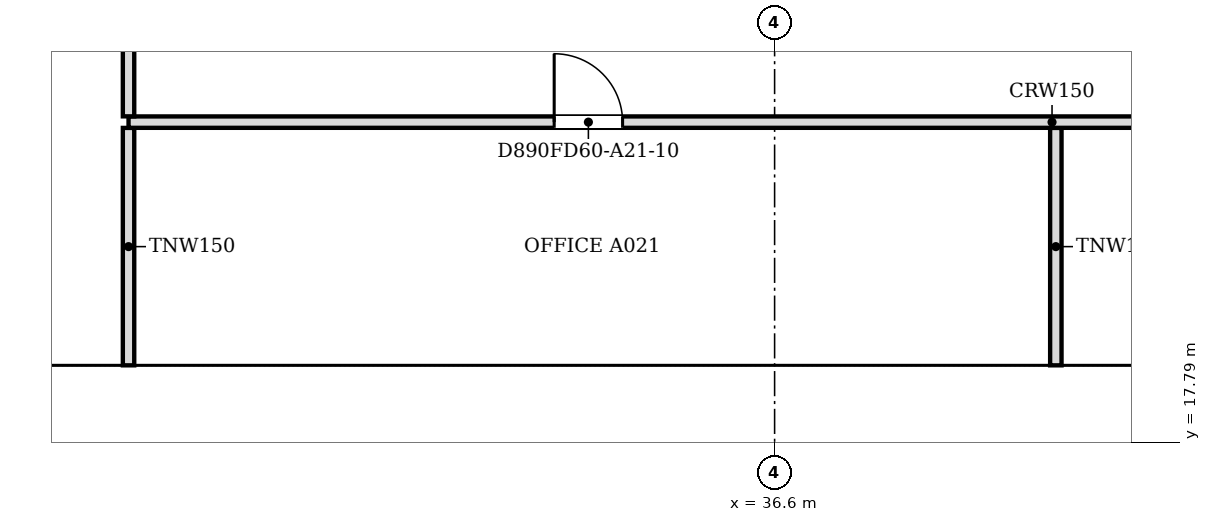
"""IFC4 building model, lengths in metres.
Left out: names, types, materials, properties, quantities, classifications, styles, units other than length and angle.
Written with IfcOpenShell. Run it as: python <this file> out.ifc"""

import sys

from ifc_helpers import new_model, si_unit, direction, frame, frame_2d, origin, place, context, subcontext, project, spatial, polyline, rectangle, outline, extrude, faceted_brep, source, transform, mapped, element, fill, save


model = new_model("IFC4")
c1 = context("Model", 3, precision=1e-05, world=origin(), true_north=direction((0.0, 1.0)))
c2 = subcontext(c1, "Body", "Model", "MODEL_VIEW")
j1 = project(units=[si_unit("LENGTHUNIT", "METRE"), si_unit("PLANEANGLEUNIT", "RADIAN")], contexts=[c1])
p1 = place(None, origin())
s1 = spatial("IfcSite", under=j1, at=p1, CompositionType="ELEMENT")
p2 = place(p1, origin())
s2 = spatial("IfcBuilding", under=s1, at=p2, CompositionType="ELEMENT")
p3 = place(p2, frame((0.0, 0.0, 248.3)))
s3 = spatial("IfcBuildingStorey", under=s2, at=p3, CompositionType="ELEMENT", Elevation=248.3)
m1 = source(origin(), c2, "Body", "SweptSolid", [
    extrude(outline(polyline([(3.05, 0.0), (6.1, 3.8), (3.05, 7.6), (0.0, 3.8), (3.05, 0.0)])), frame((0.0, 0.25, 0.0), z_axis=(0.0, -1.0, 0.0), x_axis=(1.0, 0.0, 0.0)), (0.0, 0.0, 1.0), 0.5),
])
p4 = place(p3, frame((24.4, 18.55, -3.8), z_axis=(0.0, 0.0, 1.0), x_axis=(1.0, 0.0, 0.0)))
e1 = element("IfcWall", 1, at=p4, inside=s3, PredefinedType="SOLIDWALL", context=c2, shape_type="MappedRepresentation", body=[
    mapped(m1, transform((0.0, 0.0, 0.0), scale=1.0)),
])
m2 = source(origin(), c2, "Body", "SweptSolid", [
    extrude(outline(polyline([(3.05, 0.399), (5.78, 3.8), (3.05, 7.201), (0.321, 3.8), (3.05, 0.399)])), frame((0.0, 0.26, 0.0), z_axis=(0.0, -1.0, 0.0), x_axis=(1.0, 0.0, 0.0)), (0.0, 0.0, 1.0), 0.52),
])
p5 = place(p4, origin())
e2 = element("IfcOpeningElement", 2, at=p5, cuts=e1, PredefinedType="OPENING", context=c2, shape_type="MappedRepresentation", body=[
    mapped(m2, transform((0.0, 0.0, 0.0), scale=1.0)),
])
p6 = place(p3, frame((30.5, 18.55, -3.8), z_axis=(0.0, 0.0, 1.0), x_axis=(1.0, 0.0, 0.0)))
e3 = element("IfcWall", 3, at=p6, inside=s3, PredefinedType="SOLIDWALL", context=c2, shape_type="MappedRepresentation", body=[
    mapped(m1, transform((0.0, 0.0, 0.0), scale=1.0)),
])
p7 = place(p6, origin())
e4 = element("IfcOpeningElement", 4, at=p7, cuts=e3, PredefinedType="OPENING", context=c2, shape_type="MappedRepresentation", body=[
    mapped(m2, transform((0.0, 0.0, 0.0), scale=1.0)),
])
m3 = source(origin(), c2, "Body", "Brep", [
    faceted_brep([(3.05, -0.25, 0.0), (6.1, -0.25, 3.8), (6.1, -0.25, 3.8), (3.05, -0.25, 7.6), (0.0, -0.25, 3.8), (0.0, 0.25, 3.8), (3.05, 0.25, 7.6), (6.1, 0.25, 3.8), (6.1, 0.25, 3.8), (3.05, 0.25, 0.0)], [[[0, 1, 2, 3, 4]], [[5, 6, 7, 8, 9]], [[9, 8, 1, 0]], [[7, 6, 3, 2]], [[6, 5, 4, 3]], [[5, 9, 0, 4]], [[1, 8, 7, 2]]]),
])
p8 = place(p3, frame((36.6, 18.55, -3.8), z_axis=(0.0, 0.0, 1.0), x_axis=(1.0, 0.0, 0.0)))
e5 = element("IfcWall", 5, at=p8, inside=s3, PredefinedType="SOLIDWALL", context=c2, shape_type="MappedRepresentation", body=[
    mapped(m3, transform((0.0, 0.0, 0.0), scale=1.0)),
])
p9 = place(p8, origin())
e6 = element("IfcOpeningElement", 6, at=p9, cuts=e5, PredefinedType="OPENING", context=c2, shape_type="MappedRepresentation", body=[
    mapped(m2, transform((0.0, 0.0, 0.0), scale=1.0)),
])
p10 = place(p2, frame((0.0, 0.0, 252.1)))
s4 = spatial("IfcBuildingStorey", under=s2, at=p10, CompositionType="ELEMENT", Elevation=252.1)
m4 = source(origin(), c2, "Body", "Brep", [
    faceted_brep([(3.05, -0.25, 0.0), (6.1, -0.25, 3.8), (6.1, -0.25, 3.8), (3.05, -0.25, 7.6), (0.0, -0.25, 3.8), (0.0, 0.25, 3.8), (3.05, 0.25, 7.6), (6.1, 0.25, 3.8), (6.1, 0.25, 3.8), (3.05, 0.25, 0.0)], [[[0, 1, 2, 3, 4]], [[5, 6, 7, 8, 9]], [[9, 8, 1, 0]], [[7, 6, 3, 2]], [[6, 5, 4, 3]], [[5, 9, 0, 4]], [[1, 8, 7, 2]]]),
])
p11 = place(p10, frame((21.35, 18.55, -3.8), z_axis=(0.0, 0.0, 1.0), x_axis=(1.0, 0.0, 0.0)))
e7 = element("IfcWall", 7, at=p11, inside=s4, PredefinedType="SOLIDWALL", context=c2, shape_type="MappedRepresentation", body=[
    mapped(m4, transform((0.0, 0.0, 0.0), scale=1.0)),
])
m5 = source(origin(), c2, "Body", "SweptSolid", [
    extrude(outline(polyline([(3.05, 0.399), (5.78, 3.8), (3.05, 7.2), (0.321, 3.8), (3.05, 0.399)])), frame((0.0, 0.26, 0.0), z_axis=(0.0, -1.0, 0.0), x_axis=(1.0, 0.0, 0.0)), (0.0, 0.0, 1.0), 0.52),
])
p12 = place(p11, origin())
e8 = element("IfcOpeningElement", 8, at=p12, cuts=e7, PredefinedType="OPENING", context=c2, shape_type="MappedRepresentation", body=[
    mapped(m5, transform((0.0, 0.0, 0.0), scale=1.0)),
])
m6 = source(origin(), c2, "Body", "SweptSolid", [
    extrude(outline(polyline([(3.05, 0.0), (6.1, 3.8), (3.05, 7.6), (0.0, 3.8), (3.05, 0.0)])), frame((0.0, 0.25, 0.0), z_axis=(0.0, -1.0, 0.0), x_axis=(1.0, 0.0, 0.0)), (0.0, 0.0, 1.0), 0.5),
])
p13 = place(p10, frame((27.45, 18.55, -3.8), z_axis=(0.0, 0.0, 1.0), x_axis=(1.0, 0.0, 0.0)))
e9 = element("IfcWall", 9, at=p13, inside=s4, PredefinedType="SOLIDWALL", context=c2, shape_type="MappedRepresentation", body=[
    mapped(m6, transform((0.0, 0.0, 0.0), scale=1.0)),
])
p14 = place(p13, origin())
e10 = element("IfcOpeningElement", 10, at=p14, cuts=e9, PredefinedType="OPENING", context=c2, shape_type="MappedRepresentation", body=[
    mapped(m5, transform((0.0, 0.0, 0.0), scale=1.0)),
])
p15 = place(p10, frame((33.55, 18.55, -3.8), z_axis=(0.0, 0.0, 1.0), x_axis=(1.0, 0.0, 0.0)))
e11 = element("IfcWall", 11, at=p15, inside=s4, PredefinedType="SOLIDWALL", context=c2, shape_type="MappedRepresentation", body=[
    mapped(m4, transform((0.0, 0.0, 0.0), scale=1.0)),
])
p16 = place(p15, origin())
e12 = element("IfcOpeningElement", 12, at=p16, cuts=e11, PredefinedType="OPENING", context=c2, shape_type="MappedRepresentation", body=[
    mapped(m5, transform((0.0, 0.0, 0.0), scale=1.0)),
])
p17 = place(p10, frame((39.65, 18.55, -3.8), z_axis=(0.0, 0.0, 1.0), x_axis=(1.0, 0.0, 0.0)))
e13 = element("IfcWall", 13, at=p17, inside=s4, PredefinedType="SOLIDWALL", context=c2, shape_type="MappedRepresentation", body=[
    mapped(m6, transform((0.0, 0.0, 0.0), scale=1.0)),
])
p18 = place(p17, origin())
e14 = element("IfcOpeningElement", 14, at=p18, cuts=e13, PredefinedType="OPENING", context=c2, shape_type="MappedRepresentation", body=[
    mapped(m5, transform((0.0, 0.0, 0.0), scale=1.0)),
])
for number, where, z_axis, x_axis in (
    (15, (28.1, 18.8, 0.0), (0.0, 0.0, 1.0), (0.0, 1.0, 0.0)),
    (16, (40.3, 18.8, 0.0), (0.0, 0.0, 1.0), (0.0, 1.0, 0.0)),
):
    element("IfcWall", number, at=place(p3, frame(where, z_axis=z_axis, x_axis=x_axis)), inside=s3, PredefinedType="PARTITIONING", context=c2, shape_type="SweptSolid", body=[
        extrude(rectangle(XDim=3.124, YDim=0.15, at=frame_2d((1.562, 0.0))), origin(), (0.0, 0.0, 1.0), 3.067),
    ])
p19 = place(p3, frame((57.224, 22.0, 0.0), z_axis=(0.0, 0.0, 1.0), x_axis=(-1.0, 0.0, 0.0)))
e17 = element("IfcWall", 17, at=p19, inside=s3, PredefinedType="PARTITIONING", context=c2, shape_type="SweptSolid", body=[
    extrude(rectangle(XDim=29.124, YDim=0.15, at=frame_2d((14.562, 0.0))), origin(), (0.0, 0.0, 1.0), 3.067),
])
m7 = source(origin(), c2, "Body", "SweptSolid", [
    extrude(rectangle(XDim=0.9, YDim=2.1, at=frame_2d((0.45, 1.05))), frame((0.0, 0.085, 0.0), z_axis=(0.0, -1.0, 0.0), x_axis=(1.0, 0.0, 0.0)), (0.0, 0.0, 1.0), 0.17),
])
p20 = place(p19, frame((1.923, 0.0, 0.0)))
e18 = element("IfcOpeningElement", 18, at=p20, cuts=e17, PredefinedType="OPENING", context=c2, shape_type="MappedRepresentation", body=[
    mapped(m7, transform((0.0, 0.0, 0.0), scale=1.0)),
])
p21 = place(p19, frame((22.624, 0.0, 0.0)))
e19 = element("IfcOpeningElement", 19, at=p21, cuts=e17, PredefinedType="OPENING", context=c2, shape_type="MappedRepresentation", body=[
    mapped(m7, transform((0.0, 0.0, 0.0), scale=1.0)),
])
p22 = place(p19, frame((10.424, 0.0, 0.0)))
e20 = element("IfcOpeningElement", 20, at=p22, cuts=e17, PredefinedType="OPENING", context=c2, shape_type="MappedRepresentation", body=[
    mapped(m7, transform((0.0, 0.0, 0.0), scale=1.0)),
])
p23 = place(p3, frame((28.1, 22.076, 0.0), z_axis=(0.0, 0.0, 1.0), x_axis=(0.0, 1.0, 0.0)))
e21 = element("IfcWall", 21, at=p23, inside=s3, PredefinedType="PARTITIONING", context=c2, shape_type="SweptSolid", body=[
    extrude(rectangle(XDim=22.748, YDim=0.15, at=frame_2d((11.374, 0.0))), origin(), (0.0, 0.0, 1.0), 3.067),
])
p24 = place(p23, frame((2.6, 0.0, 0.0)))
e22 = element("IfcOpeningElement", 22, at=p24, cuts=e21, PredefinedType="OPENING", context=c2, shape_type="MappedRepresentation", body=[
    mapped(m7, transform((0.0, 0.0, 0.0), scale=1.0)),
])
p25 = place(p23, frame((8.625, 0.0, 0.0)))
e23 = element("IfcOpeningElement", 23, at=p25, cuts=e21, PredefinedType="OPENING", context=c2, shape_type="MappedRepresentation", body=[
    mapped(m7, transform((0.0, 0.0, 0.0), scale=1.0)),
])
p26 = place(p23, frame((17.024, 0.0, 0.0)))
e24 = element("IfcOpeningElement", 24, at=p26, cuts=e21, PredefinedType="OPENING", context=c2, shape_type="MappedRepresentation", body=[
    mapped(m7, transform((0.0, 0.0, 0.0), scale=1.0)),
])
m8 = source(origin(), c2, "Body", "SweptSolid", [
    extrude(rectangle(XDim=0.9, YDim=2.1, at=frame_2d((0.45, 1.05))), frame((0.0, 0.025, 0.0), z_axis=(0.0, -1.0, 0.0), x_axis=(1.0, 0.0, 0.0)), (0.0, 0.0, 1.0), 0.05),
])
p27 = place(p21, origin())
e25 = element("IfcDoor", 25, at=p27, inside=s3, OperationType="SINGLE_SWING_RIGHT", PredefinedType="DOOR", context=c2, shape_type="MappedRepresentation", body=[
    mapped(m8, transform((0.0, 0.0, 0.0), scale=1.0)),
])
fill(e19, e25)
save(model, sys.argv[1])
